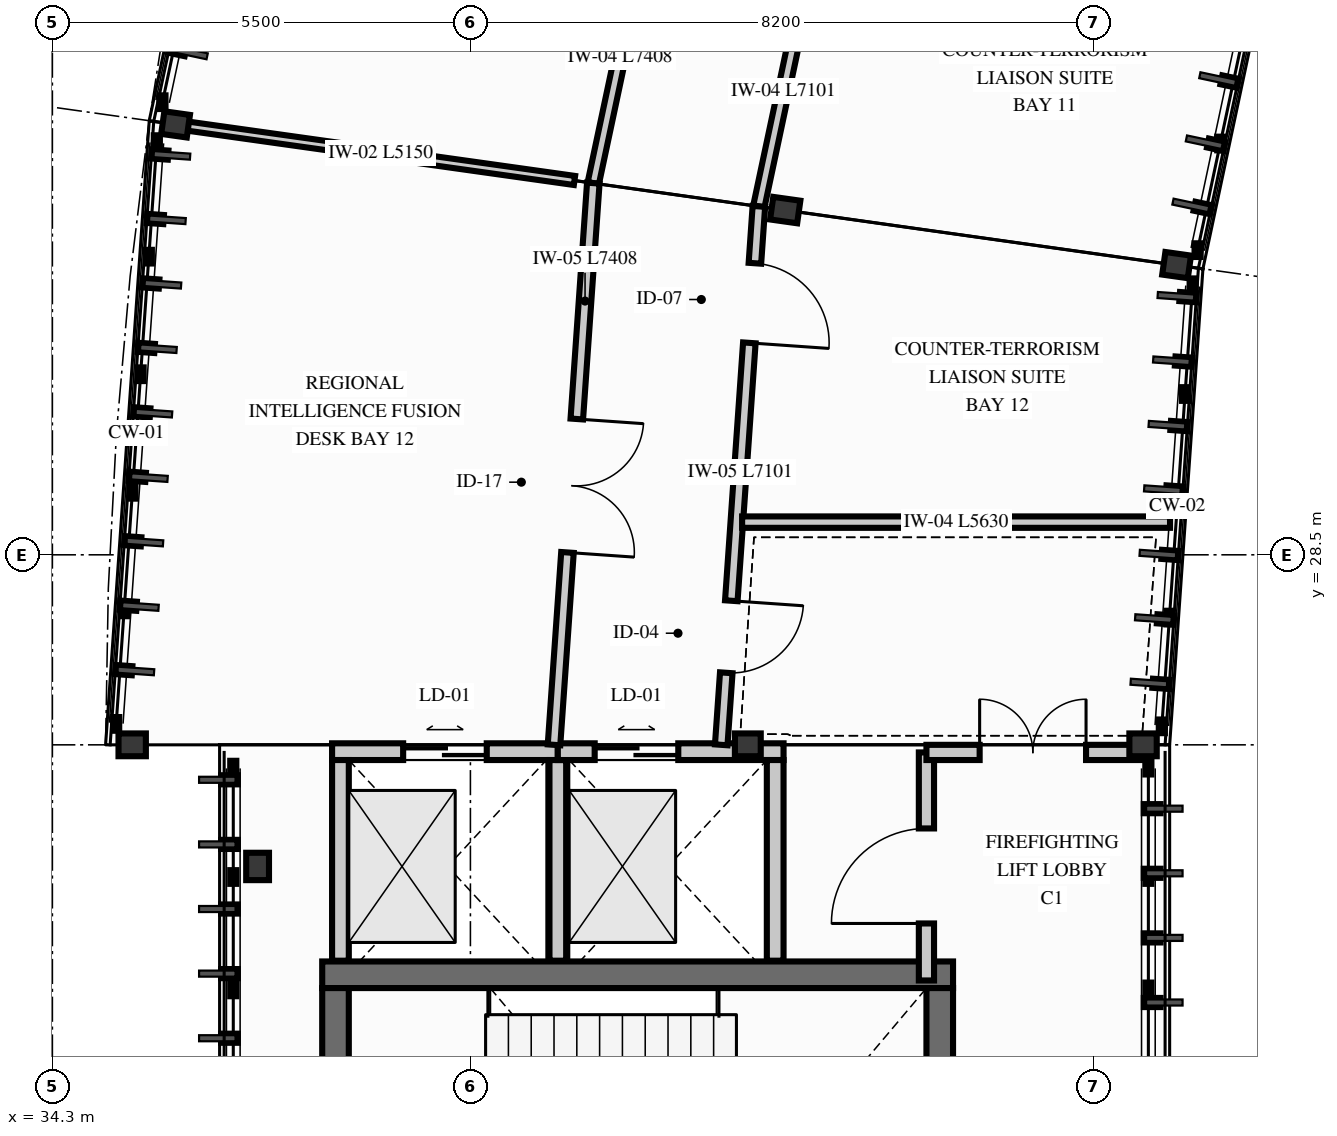
"""IFC4 building model, lengths in metres.
Left out: names, types, materials, properties, quantities, classifications, styles, units other than length and angle.
Written with IfcOpenShell. Run it as: python <this file> out.ifc"""

import sys

from ifc_helpers import new_model, si_unit, direction, frame, frame_2d, origin, origin_2d, place, context, subcontext, project, spatial, rectangle, i_section, extrude, element, fill, save


model = new_model("IFC4")
c1 = context("Model", 3, precision=1e-05, world=origin(), true_north=direction((0.0, 1.0)))
c2 = subcontext(c1, "Body", "Model", "MODEL_VIEW")
j1 = project(units=[si_unit("LENGTHUNIT", "METRE"), si_unit("PLANEANGLEUNIT", "RADIAN")], contexts=[c1])
p1 = place(None, origin())
s1 = spatial("IfcSite", under=j1, at=p1, CompositionType="ELEMENT")
p2 = place(p1, origin())
s2 = spatial("IfcBuilding", under=s1, at=p2, CompositionType="ELEMENT")
p3 = place(p2, frame((0.0, 0.0, 17.7)))
s3 = spatial("IfcBuildingStorey", under=s2, at=p3, CompositionType="ELEMENT", Elevation=17.7)
p4 = place(p3, frame((37.85, 22.975, 0.0), z_axis=(0.0, 0.0, 1.0), x_axis=(1.0, 0.0, 0.0)))
e1 = element("IfcWall", 1, at=p4, inside=s3, PredefinedType="SHEAR", context=c2, shape_type="SweptSolid", body=[
    extrude(rectangle(XDim=8.3, YDim=0.35, at=frame_2d((4.15, 0.0))), origin(), (0.0, 0.0, 1.0), 3.7),
])
p5 = place(p3, frame((38.025, 16.0, 0.0), z_axis=(0.0, 0.0, 1.0), x_axis=(0.0, 1.0, 0.0)))
e2 = element("IfcWall", 2, at=p5, inside=s3, PredefinedType="SHEAR", context=c2, shape_type="SweptSolid", body=[
    extrude(rectangle(XDim=6.8, YDim=0.35, at=frame_2d((3.4, 0.0))), origin(), (0.0, 0.0, 1.0), 3.7),
])
p6 = place(p5, frame((2.6, 0.0, 0.0)))
e3 = element("IfcOpeningElement", 3, at=p6, cuts=e2, PredefinedType="OPENING", context=c2, shape_type="SweptSolid", body=[
    extrude(rectangle(XDim=1.25, YDim=2.2, at=frame_2d((0.625, 1.1))), frame((0.0, 0.185, 0.0), z_axis=(0.0, -1.0, 0.0), x_axis=(1.0, 0.0, 0.0)), (0.0, 0.0, 1.0), 0.37),
])
p7 = place(p3, frame((45.975, 16.0, 0.0), z_axis=(0.0, 0.0, 1.0), x_axis=(0.0, 1.0, 0.0)))
e4 = element("IfcWall", 4, at=p7, inside=s3, PredefinedType="SHEAR", context=c2, shape_type="SweptSolid", body=[
    extrude(rectangle(XDim=6.8, YDim=0.35, at=frame_2d((3.4, 0.0))), origin(), (0.0, 0.0, 1.0), 3.7),
])
p8 = place(p3, frame((49.091, 32.312, 0.0), z_axis=(0.0, 0.0, 1.0), x_axis=(0.13917310096, 0.990268068742, 0.0)))
e5 = element("IfcColumn", 5, at=p8, inside=s3, PredefinedType="COLUMN", context=c2, shape_type="SweptSolid", body=[
    extrude(i_section(OverallWidth=0.3, OverallDepth=0.34, WebThickness=0.012, FlangeThickness=0.021, FilletRadius=0.027, at=origin_2d()), origin(), (0.0, 0.0, 1.0), 3.9),
])
p9 = place(p3, frame((43.942, 33.035, 0.0), z_axis=(0.0, 0.0, 1.0), x_axis=(0.13917310096, 0.990268068742, 0.0)))
e6 = element("IfcColumn", 6, at=p9, inside=s3, PredefinedType="COLUMN", context=c2, shape_type="SweptSolid", body=[
    extrude(i_section(OverallWidth=0.3, OverallDepth=0.36, WebThickness=0.012, FlangeThickness=0.022, FilletRadius=0.027, at=origin_2d()), origin(), (0.0, 0.0, 1.0), 3.9),
])
p10 = place(p3, frame((35.921, 34.163, 0.0), z_axis=(0.0, 0.0, 1.0), x_axis=(0.13917310096, 0.990268068742, 0.0)))
e7 = element("IfcColumn", 7, at=p10, inside=s3, PredefinedType="COLUMN", context=c2, shape_type="SweptSolid", body=[
    extrude(i_section(OverallWidth=0.3, OverallDepth=0.34, WebThickness=0.012, FlangeThickness=0.021, FilletRadius=0.027, at=origin_2d()), origin(), (0.0, 0.0, 1.0), 3.9),
])
p11 = place(p3, frame((48.65, 26.0, 0.0), z_axis=(0.0, 0.0, 1.0), x_axis=(0.0, 1.0, 0.0)))
e8 = element("IfcColumn", 8, at=p11, inside=s3, PredefinedType="COLUMN", context=c2, shape_type="SweptSolid", body=[
    extrude(i_section(OverallWidth=0.3, OverallDepth=0.36, WebThickness=0.012, FlangeThickness=0.022, FilletRadius=0.027, at=origin_2d()), origin(), (0.0, 0.0, 1.0), 3.9),
])
p12 = place(p3, frame((43.45, 26.0, 0.0), z_axis=(0.0, 0.0, 1.0), x_axis=(0.0, 1.0, 0.0)))
e9 = element("IfcColumn", 9, at=p12, inside=s3, PredefinedType="COLUMN", context=c2, shape_type="SweptSolid", body=[
    extrude(i_section(OverallWidth=0.3, OverallDepth=0.34, WebThickness=0.012, FlangeThickness=0.021, FilletRadius=0.027, at=origin_2d()), origin(), (0.0, 0.0, 1.0), 3.9),
])
for number, where, z_axis, x_axis in (
    (10, (35.35, 26.0, 0.0), (0.0, 0.0, 1.0), (0.0, 1.0, 0.0)),
    (11, (37.0, 24.4, 0.0), (0.0, 0.0, 1.0), (1.0, 0.0, 0.0)),
):
    element("IfcColumn", number, at=place(p3, frame(where, z_axis=z_axis, x_axis=x_axis)), inside=s3, PredefinedType="COLUMN", context=c2, shape_type="SweptSolid", body=[
        extrude(i_section(OverallWidth=0.3, OverallDepth=0.36, WebThickness=0.012, FlangeThickness=0.022, FilletRadius=0.027, at=origin_2d()), origin(), (0.0, 0.0, 1.0), 3.9),
    ])
p13 = place(p3, frame((37.98, 25.91, 0.0), z_axis=(0.0, 0.0, 1.0), x_axis=(1.0, 0.0, 0.0)))
e12 = element("IfcWall", 12, at=p13, inside=s3, PredefinedType="PARTITIONING", context=c2, shape_type="SweptSolid", body=[
    extrude(rectangle(XDim=2.97, YDim=0.22, at=frame_2d((1.485, 0.0))), origin(), (0.0, 0.0, 1.0), 3.25),
])
p14 = place(p13, frame((0.935, 0.0, 0.0)))
e13 = element("IfcOpeningElement", 13, at=p14, cuts=e12, PredefinedType="OPENING", context=c2, shape_type="SweptSolid", body=[
    extrude(rectangle(XDim=1.1, YDim=2.15, at=frame_2d((0.55, 1.075))), frame((0.0, 0.12, 0.0), z_axis=(0.0, -1.0, 0.0), x_axis=(1.0, 0.0, 0.0)), (0.0, 0.0, 1.0), 0.24),
])
for number, where, z_axis, x_axis in (
    (14, (38.09, 23.16, 0.0), (0.0, 0.0, 1.0), (0.0, 1.0, 0.0)),
    (15, (40.95, 23.16, 0.0), (0.0, 0.0, 1.0), (0.0, 1.0, 0.0)),
):
    element("IfcWall", number, at=place(p3, frame(where, z_axis=z_axis, x_axis=x_axis)), inside=s3, PredefinedType="PARTITIONING", context=c2, shape_type="SweptSolid", body=[
        extrude(rectangle(XDim=2.64, YDim=0.22, at=frame_2d((1.32, 0.0))), origin(), (0.0, 0.0, 1.0), 3.68),
    ])
p15 = place(p3, frame((40.95, 25.91, 0.0), z_axis=(0.0, 0.0, 1.0), x_axis=(1.0, 0.0, 0.0)))
e16 = element("IfcWall", 16, at=p15, inside=s3, PredefinedType="PARTITIONING", context=c2, shape_type="SweptSolid", body=[
    extrude(rectangle(XDim=2.97, YDim=0.22, at=frame_2d((1.485, 0.0))), origin(), (0.0, 0.0, 1.0), 3.25),
])
p16 = place(p15, frame((0.485, 0.0, 0.0)))
e17 = element("IfcOpeningElement", 17, at=p16, cuts=e16, PredefinedType="OPENING", context=c2, shape_type="SweptSolid", body=[
    extrude(rectangle(XDim=1.1, YDim=2.15, at=frame_2d((0.55, 1.075))), frame((0.0, 0.12, 0.0), z_axis=(0.0, -1.0, 0.0), x_axis=(1.0, 0.0, 0.0)), (0.0, 0.0, 1.0), 0.24),
])
p17 = place(p3, frame((43.81, 23.16, 0.0), z_axis=(0.0, 0.0, 1.0), x_axis=(0.0, 1.0, 0.0)))
e18 = element("IfcWall", 18, at=p17, inside=s3, PredefinedType="PARTITIONING", context=c2, shape_type="SweptSolid", body=[
    extrude(rectangle(XDim=2.64, YDim=0.22, at=frame_2d((1.32, 0.0))), origin(), (0.0, 0.0, 1.0), 3.68),
])
p18 = place(p3, frame((45.8, 22.9, 0.0), z_axis=(0.0, 0.0, 1.0), x_axis=(0.0, 1.0, 0.0)))
e19 = element("IfcWall", 19, at=p18, inside=s3, PredefinedType="PARTITIONING", context=c2, shape_type="SweptSolid", body=[
    extrude(rectangle(XDim=3.0, YDim=0.2, at=frame_2d((1.5, 0.0))), origin(), (0.0, 0.0, 1.0), 3.68),
])
p19 = place(p18, frame((0.75, 0.0, 0.0)))
e20 = element("IfcOpeningElement", 20, at=p19, cuts=e19, PredefinedType="OPENING", context=c2, shape_type="SweptSolid", body=[
    extrude(rectangle(XDim=1.25, YDim=2.2, at=frame_2d((0.625, 1.1))), frame((0.0, 0.11, 0.0), z_axis=(0.0, -1.0, 0.0), x_axis=(1.0, 0.0, 0.0)), (0.0, 0.0, 1.0), 0.22),
])
p20 = place(p3, frame((45.8, 25.9, 0.0), z_axis=(0.0, 0.0, 1.0), x_axis=(1.0, 0.0, 0.0)))
e21 = element("IfcWall", 21, at=p20, inside=s3, PredefinedType="PARTITIONING", context=c2, shape_type="SweptSolid", body=[
    extrude(rectangle(XDim=2.85, YDim=0.2, at=frame_2d((1.425, 0.0))), origin(), (0.0, 0.0, 1.0), 3.3),
])
p21 = place(p20, frame((0.7, 0.0, 0.0)))
e22 = element("IfcOpeningElement", 22, at=p21, cuts=e21, PredefinedType="OPENING", context=c2, shape_type="SweptSolid", body=[
    extrude(rectangle(XDim=1.4, YDim=2.25, at=frame_2d((0.7, 1.125))), frame((0.0, 0.11, 0.0), z_axis=(0.0, -1.0, 0.0), x_axis=(1.0, 0.0, 0.0)), (0.0, 0.0, 1.0), 0.22),
])
p22 = place(p3, frame((45.072, 40.03, 0.0), z_axis=(0.0, 0.0, 1.0), x_axis=(-0.207903987445, -0.978149238104, 0.0)))
e23 = element("IfcWall", 23, at=p22, inside=s3, PredefinedType="PARTITIONING", context=c2, shape_type="SweptSolid", body=[
    extrude(rectangle(XDim=7.101, YDim=0.15, at=frame_2d((3.551, 0.0))), origin(), (0.0, 0.0, 1.0), 3.68),
])
p23 = place(p22, frame((2.982, 0.0, 0.0)))
e24 = element("IfcOpeningElement", 24, at=p23, cuts=e23, PredefinedType="OPENING", context=c2, shape_type="SweptSolid", body=[
    extrude(rectangle(XDim=1.02, YDim=2.18, at=frame_2d((0.51, 1.09))), frame((0.0, 0.085, 0.0), z_axis=(0.0, -1.0, 0.0), x_axis=(1.0, 0.0, 0.0)), (0.0, 0.0, 1.0), 0.17),
])
p24 = place(p3, frame((42.957, 40.636, 0.0), z_axis=(0.0, 0.0, 1.0), x_axis=(-0.207921820376, -0.978145447575, 0.0)))
e25 = element("IfcWall", 25, at=p24, inside=s3, PredefinedType="PARTITIONING", context=c2, shape_type="SweptSolid", body=[
    extrude(rectangle(XDim=7.408, YDim=0.15, at=frame_2d((3.704, 0.0))), origin(), (0.0, 0.0, 1.0), 3.68),
])
p25 = place(p24, frame((3.111, 0.0, 0.0)))
e26 = element("IfcOpeningElement", 26, at=p25, cuts=e25, PredefinedType="OPENING", context=c2, shape_type="SweptSolid", body=[
    extrude(rectangle(XDim=0.9, YDim=2.1, at=frame_2d((0.45, 1.05))), frame((0.0, 0.085, 0.0), z_axis=(0.0, -1.0, 0.0), x_axis=(1.0, 0.0, 0.0)), (0.0, 0.0, 1.0), 0.17),
])
p26 = place(p3, frame((41.169, 33.425, 0.0), z_axis=(0.0, 0.0, 1.0), x_axis=(-0.990266484291, 0.13918437445, 0.0)))
e27 = element("IfcWall", 27, at=p26, inside=s3, PredefinedType="PARTITIONING", context=c2, shape_type="SweptSolid", body=[
    extrude(rectangle(XDim=5.15, YDim=0.12, at=frame_2d((2.575, 0.0))), origin(), (0.0, 0.0, 1.0), 3.25),
])
p27 = place(p3, frame((43.595, 33.084, 0.0), z_axis=(0.0, 0.0, 1.0), x_axis=(-0.069756597752, -0.997564041588, 0.0)))
e28 = element("IfcWall", 28, at=p27, inside=s3, PredefinedType="PARTITIONING", context=c2, shape_type="SweptSolid", body=[
    extrude(rectangle(XDim=7.101, YDim=0.165, at=frame_2d((3.551, 0.0))), origin(), (0.0, 0.0, 1.0), 3.68),
])
p28 = place(p27, frame((5.201, 0.0, 0.0)))
e29 = element("IfcOpeningElement", 29, at=p28, cuts=e28, PredefinedType="OPENING", context=c2, shape_type="SweptSolid", body=[
    extrude(rectangle(XDim=0.95, YDim=2.15, at=frame_2d((0.475, 1.075))), frame((0.0, 0.093, 0.0), z_axis=(0.0, -1.0, 0.0), x_axis=(1.0, 0.0, 0.0)), (0.0, 0.0, 1.0), 0.185),
])
p29 = place(p27, frame((0.75, 0.0, 0.0)))
e30 = element("IfcOpeningElement", 30, at=p29, cuts=e28, PredefinedType="OPENING", context=c2, shape_type="SweptSolid", body=[
    extrude(rectangle(XDim=1.05, YDim=2.2, at=frame_2d((0.525, 1.1))), frame((0.0, 0.093, 0.0), z_axis=(0.0, -1.0, 0.0), x_axis=(1.0, 0.0, 0.0)), (0.0, 0.0, 1.0), 0.185),
])
p30 = place(p3, frame((41.417, 33.39, 0.0), z_axis=(0.0, 0.0, 1.0), x_axis=(-0.069766817412, -0.997563326906, 0.0)))
e31 = element("IfcWall", 31, at=p30, inside=s3, PredefinedType="PARTITIONING", context=c2, shape_type="SweptSolid", body=[
    extrude(rectangle(XDim=7.408, YDim=0.165, at=frame_2d((3.704, 0.0))), origin(), (0.0, 0.0, 1.0), 3.68),
])
p31 = place(p30, frame((3.111, 0.0, 0.0)))
e32 = element("IfcOpeningElement", 32, at=p31, cuts=e31, PredefinedType="OPENING", context=c2, shape_type="SweptSolid", body=[
    extrude(rectangle(XDim=1.76, YDim=2.36, at=frame_2d((0.88, 1.18))), frame((0.0, 0.093, 0.0), z_axis=(0.0, -1.0, 0.0), x_axis=(1.0, 0.0, 0.0)), (0.0, 0.0, 1.0), 0.185),
])
p32 = place(p3, frame((43.375, 28.93, 0.0), z_axis=(0.0, 0.0, 1.0), x_axis=(1.0, 0.0, 0.0)))
e33 = element("IfcWall", 33, at=p32, inside=s3, PredefinedType="PARTITIONING", context=c2, shape_type="SweptSolid", body=[
    extrude(rectangle(XDim=5.63, YDim=0.15, at=frame_2d((2.815, 0.0))), origin(), (0.0, 0.0, 1.0), 3.398),
])
p33 = place(p14, origin())
e34 = element("IfcDoor", 34, at=p33, inside=s3, OperationType="DOUBLE_DOOR_SLIDING", PredefinedType="DOOR", context=c2, shape_type="SweptSolid", body=[
    extrude(rectangle(XDim=1.1, YDim=2.15, at=frame_2d((0.55, 1.075))), frame((0.0, 0.025, 0.0), z_axis=(0.0, -1.0, 0.0), x_axis=(1.0, 0.0, 0.0)), (0.0, 0.0, 1.0), 0.05),
])
fill(e13, e34)
p34 = place(p16, origin())
e35 = element("IfcDoor", 35, at=p34, inside=s3, OperationType="DOUBLE_DOOR_SLIDING", PredefinedType="DOOR", context=c2, shape_type="SweptSolid", body=[
    extrude(rectangle(XDim=1.1, YDim=2.15, at=frame_2d((0.55, 1.075))), frame((0.0, 0.025, 0.0), z_axis=(0.0, -1.0, 0.0), x_axis=(1.0, 0.0, 0.0)), (0.0, 0.0, 1.0), 0.05),
])
fill(e17, e35)
p35 = place(p21, origin())
e36 = element("IfcDoor", 36, at=p35, inside=s3, OperationType="DOUBLE_DOOR_SINGLE_SWING", PredefinedType="DOOR", context=c2, shape_type="SweptSolid", body=[
    extrude(rectangle(XDim=1.4, YDim=2.25, at=frame_2d((0.7, 1.125))), frame((0.0, 0.025, 0.0), z_axis=(0.0, -1.0, 0.0), x_axis=(1.0, 0.0, 0.0)), (0.0, 0.0, 1.0), 0.05),
])
fill(e22, e36)
p36 = place(p19, origin())
e37 = element("IfcDoor", 37, at=p36, inside=s3, OperationType="SINGLE_SWING_LEFT", PredefinedType="DOOR", context=c2, shape_type="SweptSolid", body=[
    extrude(rectangle(XDim=1.25, YDim=2.2, at=frame_2d((0.625, 1.1))), frame((0.0, 0.025, 0.0), z_axis=(0.0, -1.0, 0.0), x_axis=(1.0, 0.0, 0.0)), (0.0, 0.0, 1.0), 0.05),
])
fill(e20, e37)
p37 = place(p28, origin())
e38 = element("IfcDoor", 38, at=p37, inside=s3, OperationType="SINGLE_SWING_LEFT", PredefinedType="DOOR", context=c2, shape_type="SweptSolid", body=[
    extrude(rectangle(XDim=0.95, YDim=2.15, at=frame_2d((0.475, 1.075))), frame((0.0, 0.025, 0.0), z_axis=(0.0, -1.0, 0.0), x_axis=(1.0, 0.0, 0.0)), (0.0, 0.0, 1.0), 0.05),
])
fill(e29, e38)
p38 = place(p29, origin())
e39 = element("IfcDoor", 39, at=p38, inside=s3, OperationType="SINGLE_SWING_RIGHT", PredefinedType="DOOR", context=c2, shape_type="SweptSolid", body=[
    extrude(rectangle(XDim=1.05, YDim=2.2, at=frame_2d((0.525, 1.1))), frame((0.0, 0.025, 0.0), z_axis=(0.0, -1.0, 0.0), x_axis=(1.0, 0.0, 0.0)), (0.0, 0.0, 1.0), 0.05),
])
fill(e30, e39)
p39 = place(p31, origin())
e40 = element("IfcDoor", 40, at=p39, inside=s3, OperationType="DOUBLE_DOOR_SINGLE_SWING", PredefinedType="DOOR", context=c2, shape_type="SweptSolid", body=[
    extrude(rectangle(XDim=1.76, YDim=2.36, at=frame_2d((0.88, 1.18))), frame((0.0, 0.025, 0.0), z_axis=(0.0, -1.0, 0.0), x_axis=(1.0, 0.0, 0.0)), (0.0, 0.0, 1.0), 0.05),
])
fill(e32, e40)
save(model, sys.argv[1])
